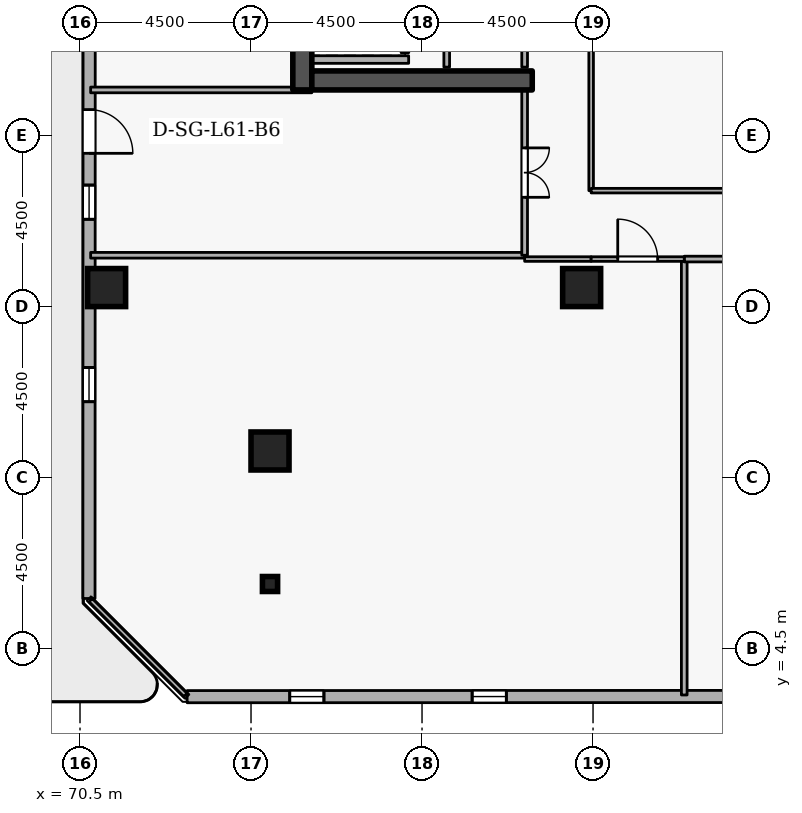
"""IFC4 building model, lengths in metres.
Left out: names, types, materials, properties, quantities, classifications, styles, units other than length and angle.
Written with IfcOpenShell. Run it as: python <this file> out.ifc"""

import sys

from ifc_helpers import new_model, si_unit, direction, frame, frame_2d, origin, origin_2d, place, context, subcontext, project, spatial, rectangle, i_section, extrude, element, fill, save


model = new_model("IFC4")
c1 = context("Model", 3, precision=1e-05, world=origin(), true_north=direction((0.0, 1.0)))
c2 = subcontext(c1, "Body", "Model", "MODEL_VIEW")
j1 = project(units=[si_unit("LENGTHUNIT", "METRE"), si_unit("PLANEANGLEUNIT", "RADIAN")], contexts=[c1])
p1 = place(None, origin())
s1 = spatial("IfcSite", under=j1, at=p1, CompositionType="ELEMENT")
p2 = place(p1, origin())
s2 = spatial("IfcBuilding", under=s1, at=p2, CompositionType="ELEMENT")
p3 = place(p2, frame((0.0, 0.0, 229.5)))
s3 = spatial("IfcBuildingStorey", under=s2, at=p3, CompositionType="ELEMENT", Elevation=229.5)
p4 = place(p3, frame((76.35, 19.2, 0.0), z_axis=(0.0, 0.0, 1.0), x_axis=(0.0, 1.0, 0.0)))
e1 = element("IfcWall", 1, at=p4, inside=s3, PredefinedType="SHEAR", context=c2, shape_type="SweptSolid", body=[
    extrude(rectangle(XDim=15.6, YDim=0.5, at=frame_2d((7.8, 0.0))), origin(), (0.0, 0.0, 1.0), 3.6),
])
p5 = place(p3, frame((76.6, 19.45, 0.0), z_axis=(0.0, 0.0, 1.0), x_axis=(1.0, 0.0, 0.0)))
e2 = element("IfcWall", 2, at=p5, inside=s3, PredefinedType="SHEAR", context=c2, shape_type="SweptSolid", body=[
    extrude(rectangle(XDim=5.8, YDim=0.5, at=frame_2d((2.9, 0.0))), origin(), (0.0, 0.0, 1.0), 3.6),
])
for number, where, z_axis, x_axis in (
    (3, (71.2, 14.0, 0.0), (0.0, 0.0, 1.0), (1.0, 0.0, 0.0)),
    (4, (75.5, 9.7, 0.0), (0.0, 0.0, 1.0), (1.0, 0.0, 0.0)),
    (5, (83.7, 14.0, 0.0), (0.0, 0.0, 1.0), (1.0, 0.0, 0.0)),
):
    element("IfcColumn", number, at=place(p3, frame(where, z_axis=z_axis, x_axis=x_axis)), inside=s3, PredefinedType="COLUMN", context=c2, shape_type="SweptSolid", body=[
        extrude(rectangle(XDim=1.0, YDim=1.0, at=origin_2d()), origin(), (0.0, 0.0, 1.0), 3.6),
    ])
p6 = place(p3, frame((75.5, 6.2, 0.0), z_axis=(0.0, 0.0, 1.0), x_axis=(1.0, 0.0, 0.0)))
e6 = element("IfcColumn", 6, at=p6, inside=s3, PredefinedType="COLUMN", context=c2, shape_type="SweptSolid", body=[
    extrude(i_section(OverallWidth=0.399, OverallDepth=0.394, WebThickness=0.023, FlangeThickness=0.037, FilletRadius=0.015, at=origin_2d()), origin(), (0.0, 0.0, 1.0), 3.6),
])
p7 = place(p3, frame((73.319, 3.235, 0.0), z_axis=(0.0, 0.0, 1.0), x_axis=(0.999999933399, 0.000364968916, 0.0)))
e7 = element("IfcWall", 7, at=p7, inside=s3, PredefinedType="STANDARD", context=c2, shape_type="SweptSolid", body=[
    extrude(rectangle(XDim=32.778, YDim=0.32, at=frame_2d((16.389, 0.0))), origin(), (0.0, 0.0, 1.0), 2.7),
])
p8 = place(p7, frame((2.7, 0.0, 0.72)))
e8 = element("IfcOpeningElement", 8, at=p8, cuts=e7, PredefinedType="OPENING", context=c2, shape_type="SweptSolid", body=[
    extrude(rectangle(XDim=0.9, YDim=1.75, at=frame_2d((0.45, 0.875))), frame((0.0, 0.17, 0.0), z_axis=(0.0, -1.0, 0.0), x_axis=(1.0, 0.0, 0.0)), (0.0, 0.0, 1.0), 0.34),
])
p9 = place(p7, frame((7.5, 0.0, 0.72)))
e9 = element("IfcOpeningElement", 9, at=p9, cuts=e7, PredefinedType="OPENING", context=c2, shape_type="SweptSolid", body=[
    extrude(rectangle(XDim=0.9, YDim=1.75, at=frame_2d((0.45, 0.875))), frame((0.0, 0.17, 0.0), z_axis=(0.0, -1.0, 0.0), x_axis=(1.0, 0.0, 0.0)), (0.0, 0.0, 1.0), 0.34),
])
p10 = place(p7, frame((21.9, 0.0, 0.72)))
e10 = element("IfcOpeningElement", 10, at=p10, cuts=e7, PredefinedType="OPENING", context=c2, shape_type="SweptSolid", body=[
    extrude(rectangle(XDim=0.9, YDim=1.75, at=frame_2d((0.45, 0.875))), frame((0.0, 0.17, 0.0), z_axis=(0.0, -1.0, 0.0), x_axis=(1.0, 0.0, 0.0)), (0.0, 0.0, 1.0), 0.34),
])
p11 = place(p7, frame((26.7, 0.0, 0.72)))
e11 = element("IfcOpeningElement", 11, at=p11, cuts=e7, PredefinedType="OPENING", context=c2, shape_type="SweptSolid", body=[
    extrude(rectangle(XDim=0.9, YDim=1.75, at=frame_2d((0.45, 0.875))), frame((0.0, 0.17, 0.0), z_axis=(0.0, -1.0, 0.0), x_axis=(1.0, 0.0, 0.0)), (0.0, 0.0, 1.0), 0.34),
])
p12 = place(p3, frame((70.747, 38.596, 0.0), z_axis=(0.0, 0.0, 1.0), x_axis=(-0.000364968916, -0.999999933399, 0.0)))
e12 = element("IfcWall", 12, at=p12, inside=s3, PredefinedType="STANDARD", context=c2, shape_type="SweptSolid", body=[
    extrude(rectangle(XDim=32.778, YDim=0.32, at=frame_2d((16.389, 0.0))), origin(), (0.0, 0.0, 1.0), 2.7),
])
p13 = place(p12, frame((19.914, 0.0, 0.0)))
e13 = element("IfcOpeningElement", 13, at=p13, cuts=e12, PredefinedType="OPENING", context=c2, shape_type="SweptSolid", body=[
    extrude(rectangle(XDim=1.15, YDim=2.1, at=frame_2d((0.575, 1.05))), frame((0.0, 0.17, 0.0), z_axis=(0.0, -1.0, 0.0), x_axis=(1.0, 0.0, 0.0)), (0.0, 0.0, 1.0), 0.34),
])
p14 = place(p12, frame((2.7, 0.0, 0.72)))
e14 = element("IfcOpeningElement", 14, at=p14, cuts=e12, PredefinedType="OPENING", context=c2, shape_type="SweptSolid", body=[
    extrude(rectangle(XDim=0.9, YDim=1.75, at=frame_2d((0.45, 0.875))), frame((0.0, 0.17, 0.0), z_axis=(0.0, -1.0, 0.0), x_axis=(1.0, 0.0, 0.0)), (0.0, 0.0, 1.0), 0.34),
])
p15 = place(p12, frame((7.5, 0.0, 0.72)))
e15 = element("IfcOpeningElement", 15, at=p15, cuts=e12, PredefinedType="OPENING", context=c2, shape_type="SweptSolid", body=[
    extrude(rectangle(XDim=0.9, YDim=1.75, at=frame_2d((0.45, 0.875))), frame((0.0, 0.17, 0.0), z_axis=(0.0, -1.0, 0.0), x_axis=(1.0, 0.0, 0.0)), (0.0, 0.0, 1.0), 0.34),
])
p16 = place(p12, frame((17.1, 0.0, 0.72)))
e16 = element("IfcOpeningElement", 16, at=p16, cuts=e12, PredefinedType="OPENING", context=c2, shape_type="SweptSolid", body=[
    extrude(rectangle(XDim=0.9, YDim=1.75, at=frame_2d((0.45, 0.875))), frame((0.0, 0.17, 0.0), z_axis=(0.0, -1.0, 0.0), x_axis=(1.0, 0.0, 0.0)), (0.0, 0.0, 1.0), 0.34),
])
p17 = place(p12, frame((21.9, 0.0, 0.72)))
e17 = element("IfcOpeningElement", 17, at=p17, cuts=e12, PredefinedType="OPENING", context=c2, shape_type="SweptSolid", body=[
    extrude(rectangle(XDim=0.9, YDim=1.75, at=frame_2d((0.45, 0.875))), frame((0.0, 0.17, 0.0), z_axis=(0.0, -1.0, 0.0), x_axis=(1.0, 0.0, 0.0)), (0.0, 0.0, 1.0), 0.34),
])
p18 = place(p12, frame((26.7, 0.0, 0.72)))
e18 = element("IfcOpeningElement", 18, at=p18, cuts=e12, PredefinedType="OPENING", context=c2, shape_type="SweptSolid", body=[
    extrude(rectangle(XDim=0.9, YDim=1.75, at=frame_2d((0.45, 0.875))), frame((0.0, 0.17, 0.0), z_axis=(0.0, -1.0, 0.0), x_axis=(1.0, 0.0, 0.0)), (0.0, 0.0, 1.0), 0.34),
])
p19 = place(p3, frame((79.05, 20.18, 0.0), z_axis=(0.0, 0.0, 1.0), x_axis=(0.0, 1.0, 0.0)))
e19 = element("IfcWall", 19, at=p19, inside=s3, PredefinedType="STANDARD", context=c2, shape_type="SweptSolid", body=[
    extrude(rectangle(XDim=1.94, YDim=0.2, at=frame_2d((0.97, 0.0))), origin(), (0.0, 0.0, 1.0), 3.3),
])
p20 = place(p19, frame((0.46, 0.0, 0.0)))
e20 = element("IfcOpeningElement", 20, at=p20, cuts=e19, PredefinedType="OPENING", context=c2, shape_type="SweptSolid", body=[
    extrude(rectangle(XDim=1.02, YDim=2.06, at=frame_2d((0.51, 1.03))), frame((0.0, 0.11, 0.0), z_axis=(0.0, -1.0, 0.0), x_axis=(1.0, 0.0, 0.0)), (0.0, 0.0, 1.0), 0.22),
])
p21 = place(p3, frame((76.612, 20.0, 0.0), z_axis=(0.0, 0.0, 1.0), x_axis=(1.0, 0.0, 0.0)))
e21 = element("IfcWall", 21, at=p21, inside=s3, PredefinedType="STANDARD", context=c2, shape_type="SweptSolid", body=[
    extrude(rectangle(XDim=2.536, YDim=0.2, at=frame_2d((1.268, 0.0))), origin(), (0.0, 0.0, 1.0), 3.3),
])
p22 = place(p3, frame((82.2, 19.8, 0.0), z_axis=(0.0, 0.0, 1.0), x_axis=(0.0, 1.0, 0.0)))
e22 = element("IfcWall", 22, at=p22, inside=s3, PredefinedType="PARTITIONING", context=c2, shape_type="SweptSolid", body=[
    extrude(rectangle(XDim=2.25, YDim=0.15, at=frame_2d((1.125, 0.0))), origin(), (0.0, 0.0, 1.0), 3.3),
])
p23 = place(p22, frame((0.665, 0.0, 0.0)))
e23 = element("IfcOpeningElement", 23, at=p23, cuts=e22, PredefinedType="OPENING", context=c2, shape_type="SweptSolid", body=[
    extrude(rectangle(XDim=0.92, YDim=2.08, at=frame_2d((0.46, 1.04))), frame((0.0, 0.085, 0.0), z_axis=(0.0, -1.0, 0.0), x_axis=(1.0, 0.0, 0.0)), (0.0, 0.0, 1.0), 0.17),
])
p24 = place(p3, frame((80.15, 22.05, 0.0), z_axis=(0.0, 0.0, 1.0), x_axis=(0.0, -1.0, 0.0)))
e24 = element("IfcWall", 24, at=p24, inside=s3, PredefinedType="PARTITIONING", context=c2, shape_type="SweptSolid", body=[
    extrude(rectangle(XDim=2.25, YDim=0.15, at=frame_2d((1.125, 0.0))), origin(), (0.0, 0.0, 1.0), 3.3),
])
p25 = place(p3, frame((82.2, 14.85, 0.0), z_axis=(0.0, 0.0, 1.0), x_axis=(-1.0, 0.0, 0.0)))
e25 = element("IfcWall", 25, at=p25, inside=s3, PredefinedType="PARTITIONING", context=c2, shape_type="SweptSolid", body=[
    extrude(rectangle(XDim=11.42, YDim=0.15, at=frame_2d((5.71, 0.0))), origin(), (0.0, 0.0, 1.0), 3.3),
])
p26 = place(p3, frame((70.78, 19.2, 0.0), z_axis=(0.0, 0.0, 1.0), x_axis=(1.0, 0.0, 0.0)))
e26 = element("IfcWall", 26, at=p26, inside=s3, PredefinedType="PARTITIONING", context=c2, shape_type="SweptSolid", body=[
    extrude(rectangle(XDim=5.82, YDim=0.15, at=frame_2d((2.91, 0.0))), origin(), (0.0, 0.0, 1.0), 2.505),
])
p27 = place(p3, frame((82.2, 19.2, 0.0), z_axis=(0.0, 0.0, 1.0), x_axis=(0.0, -1.0, 0.0)))
e27 = element("IfcWall", 27, at=p27, inside=s3, PredefinedType="PARTITIONING", context=c2, shape_type="SweptSolid", body=[
    extrude(rectangle(XDim=4.35, YDim=0.15, at=frame_2d((2.175, 0.0))), origin(), (0.0, 0.0, 1.0), 3.3),
])
p28 = place(p27, frame((1.525, 0.0, 0.0)))
e28 = element("IfcOpeningElement", 28, at=p28, cuts=e27, PredefinedType="OPENING", context=c2, shape_type="SweptSolid", body=[
    extrude(rectangle(XDim=1.3, YDim=2.12, at=frame_2d((0.65, 1.06))), frame((0.0, 0.085, 0.0), z_axis=(0.0, -1.0, 0.0), x_axis=(1.0, 0.0, 0.0)), (0.0, 0.0, 1.0), 0.17),
])
p29 = place(p3, frame((86.4, 3.28, 0.0), z_axis=(0.0, 0.0, 1.0), x_axis=(0.0, 1.0, 0.0)))
e29 = element("IfcWall", 29, at=p29, inside=s3, PredefinedType="PARTITIONING", context=c2, shape_type="SweptSolid", body=[
    extrude(rectangle(XDim=11.47, YDim=0.15, at=frame_2d((5.735, 0.0))), origin(), (0.0, 0.0, 1.0), 3.3),
])
p30 = place(p3, frame((86.4, 14.75, 0.0), z_axis=(0.0, 0.0, 1.0), x_axis=(1.0, 0.0, 0.0)))
e30 = element("IfcWall", 30, at=p30, inside=s3, PredefinedType="PARTITIONING", context=c2, shape_type="SweptSolid", body=[
    extrude(rectangle(XDim=4.2, YDim=0.15, at=frame_2d((2.1, 0.0))), origin(), (0.0, 0.0, 1.0), 3.3),
])
p31 = place(p30, frame((1.45, 0.0, 0.0)))
e31 = element("IfcOpeningElement", 31, at=p31, cuts=e30, PredefinedType="OPENING", context=c2, shape_type="SweptSolid", body=[
    extrude(rectangle(XDim=1.3, YDim=2.12, at=frame_2d((0.65, 1.06))), frame((0.0, 0.085, 0.0), z_axis=(0.0, -1.0, 0.0), x_axis=(1.0, 0.0, 0.0)), (0.0, 0.0, 1.0), 0.17),
])
p32 = place(p3, frame((73.275, 3.28, 0.0), z_axis=(0.0, 0.0, 1.0), x_axis=(-0.707106781187, 0.707106781187, 0.0)))
e32 = element("IfcWall", 32, at=p32, inside=s3, PredefinedType="PARTITIONING", context=c2, shape_type="SweptSolid", body=[
    extrude(rectangle(XDim=3.528, YDim=0.12, at=frame_2d((1.764, 0.0))), origin(), (0.0, 0.0, 1.0), 3.3),
])
p33 = place(p3, frame((82.2, 14.75, 0.0), z_axis=(0.0, 0.0, 1.0), x_axis=(1.0, 0.0, 0.0)))
e33 = element("IfcWall", 33, at=p33, inside=s3, PredefinedType="PARTITIONING", context=c2, shape_type="SweptSolid", body=[
    extrude(rectangle(XDim=1.75, YDim=0.12, at=frame_2d((0.875, 0.0))), origin(), (0.0, 0.0, 1.0), 3.3),
])
p34 = place(p3, frame((83.95, 14.75, 0.0), z_axis=(0.0, 0.0, 1.0), x_axis=(1.0, 0.0, 0.0)))
e34 = element("IfcWall", 34, at=p34, inside=s3, PredefinedType="PARTITIONING", context=c2, shape_type="SweptSolid", body=[
    extrude(rectangle(XDim=2.45, YDim=0.12, at=frame_2d((1.225, 0.0))), origin(), (0.0, 0.0, 1.0), 3.3),
])
p35 = place(p34, frame((0.7, 0.0, 0.0)))
e35 = element("IfcOpeningElement", 35, at=p35, cuts=e34, PredefinedType="OPENING", context=c2, shape_type="SweptSolid", body=[
    extrude(rectangle(XDim=1.05, YDim=2.1, at=frame_2d((0.525, 1.05))), frame((0.0, 0.07, 0.0), z_axis=(0.0, -1.0, 0.0), x_axis=(1.0, 0.0, 0.0)), (0.0, 0.0, 1.0), 0.14),
])
p36 = place(p3, frame((83.95, 16.55, 0.0), z_axis=(0.0, 0.0, 1.0), x_axis=(0.0, 1.0, 0.0)))
e36 = element("IfcWall", 36, at=p36, inside=s3, PredefinedType="PARTITIONING", context=c2, shape_type="SweptSolid", body=[
    extrude(rectangle(XDim=5.85, YDim=0.12, at=frame_2d((2.925, 0.0))), origin(), (0.0, 0.0, 1.0), 3.3),
])
p37 = place(p3, frame((93.05, 16.55, 0.0), z_axis=(0.0, 0.0, 1.0), x_axis=(-1.0, 0.0, 0.0)))
e37 = element("IfcWall", 37, at=p37, inside=s3, PredefinedType="PARTITIONING", context=c2, shape_type="SweptSolid", body=[
    extrude(rectangle(XDim=9.1, YDim=0.12, at=frame_2d((4.55, 0.0))), origin(), (0.0, 0.0, 1.0), 3.3),
])
p38 = place(p37, frame((4.075, 0.0, 0.0)))
e38 = element("IfcOpeningElement", 38, at=p38, cuts=e37, PredefinedType="OPENING", context=c2, shape_type="SweptSolid", body=[
    extrude(rectangle(XDim=0.95, YDim=2.1, at=frame_2d((0.475, 1.05))), frame((0.0, 0.07, 0.0), z_axis=(0.0, -1.0, 0.0), x_axis=(1.0, 0.0, 0.0)), (0.0, 0.0, 1.0), 0.14),
])
p39 = place(p8, origin())
e39 = element("IfcWindow", 39, at=p39, inside=s3, PartitioningType="SINGLE_PANEL", PredefinedType="WINDOW", context=c2, shape_type="SweptSolid", body=[
    extrude(rectangle(XDim=0.9, YDim=1.75, at=frame_2d((0.45, 0.875))), frame((0.0, 0.03, 0.0), z_axis=(0.0, -1.0, 0.0), x_axis=(1.0, 0.0, 0.0)), (0.0, 0.0, 1.0), 0.06),
])
fill(e8, e39)
p40 = place(p9, origin())
e40 = element("IfcWindow", 40, at=p40, inside=s3, PartitioningType="SINGLE_PANEL", PredefinedType="WINDOW", context=c2, shape_type="SweptSolid", body=[
    extrude(rectangle(XDim=0.9, YDim=1.75, at=frame_2d((0.45, 0.875))), frame((0.0, 0.03, 0.0), z_axis=(0.0, -1.0, 0.0), x_axis=(1.0, 0.0, 0.0)), (0.0, 0.0, 1.0), 0.06),
])
fill(e9, e40)
p41 = place(p13, origin())
e41 = element("IfcDoor", 41, at=p41, inside=s3, OperationType="SINGLE_SWING_RIGHT", PredefinedType="DOOR", context=c2, shape_type="SweptSolid", body=[
    extrude(rectangle(XDim=1.15, YDim=2.1, at=frame_2d((0.575, 1.05))), frame((0.0, 0.025, 0.0), z_axis=(0.0, -1.0, 0.0), x_axis=(1.0, 0.0, 0.0)), (0.0, 0.0, 1.0), 0.05),
])
fill(e13, e41)
p42 = place(p17, origin())
e42 = element("IfcWindow", 42, at=p42, inside=s3, PartitioningType="SINGLE_PANEL", PredefinedType="WINDOW", context=c2, shape_type="SweptSolid", body=[
    extrude(rectangle(XDim=0.9, YDim=1.75, at=frame_2d((0.45, 0.875))), frame((0.0, 0.03, 0.0), z_axis=(0.0, -1.0, 0.0), x_axis=(1.0, 0.0, 0.0)), (0.0, 0.0, 1.0), 0.06),
])
fill(e17, e42)
p43 = place(p18, origin())
e43 = element("IfcWindow", 43, at=p43, inside=s3, PartitioningType="SINGLE_PANEL", PredefinedType="WINDOW", context=c2, shape_type="SweptSolid", body=[
    extrude(rectangle(XDim=0.9, YDim=1.75, at=frame_2d((0.45, 0.875))), frame((0.0, 0.03, 0.0), z_axis=(0.0, -1.0, 0.0), x_axis=(1.0, 0.0, 0.0)), (0.0, 0.0, 1.0), 0.06),
])
fill(e18, e43)
p44 = place(p28, origin())
e44 = element("IfcDoor", 44, at=p44, inside=s3, OperationType="DOUBLE_DOOR_SINGLE_SWING", PredefinedType="DOOR", context=c2, shape_type="SweptSolid", body=[
    extrude(rectangle(XDim=1.3, YDim=2.12, at=frame_2d((0.65, 1.06))), frame((0.0, 0.025, 0.0), z_axis=(0.0, -1.0, 0.0), x_axis=(1.0, 0.0, 0.0)), (0.0, 0.0, 1.0), 0.05),
])
fill(e28, e44)
p45 = place(p35, origin())
e45 = element("IfcDoor", 45, at=p45, inside=s3, OperationType="SINGLE_SWING_LEFT", PredefinedType="DOOR", context=c2, shape_type="SweptSolid", body=[
    extrude(rectangle(XDim=1.05, YDim=2.1, at=frame_2d((0.525, 1.05))), frame((0.0, 0.025, 0.0), z_axis=(0.0, -1.0, 0.0), x_axis=(1.0, 0.0, 0.0)), (0.0, 0.0, 1.0), 0.05),
])
fill(e35, e45)
save(model, sys.argv[1])
